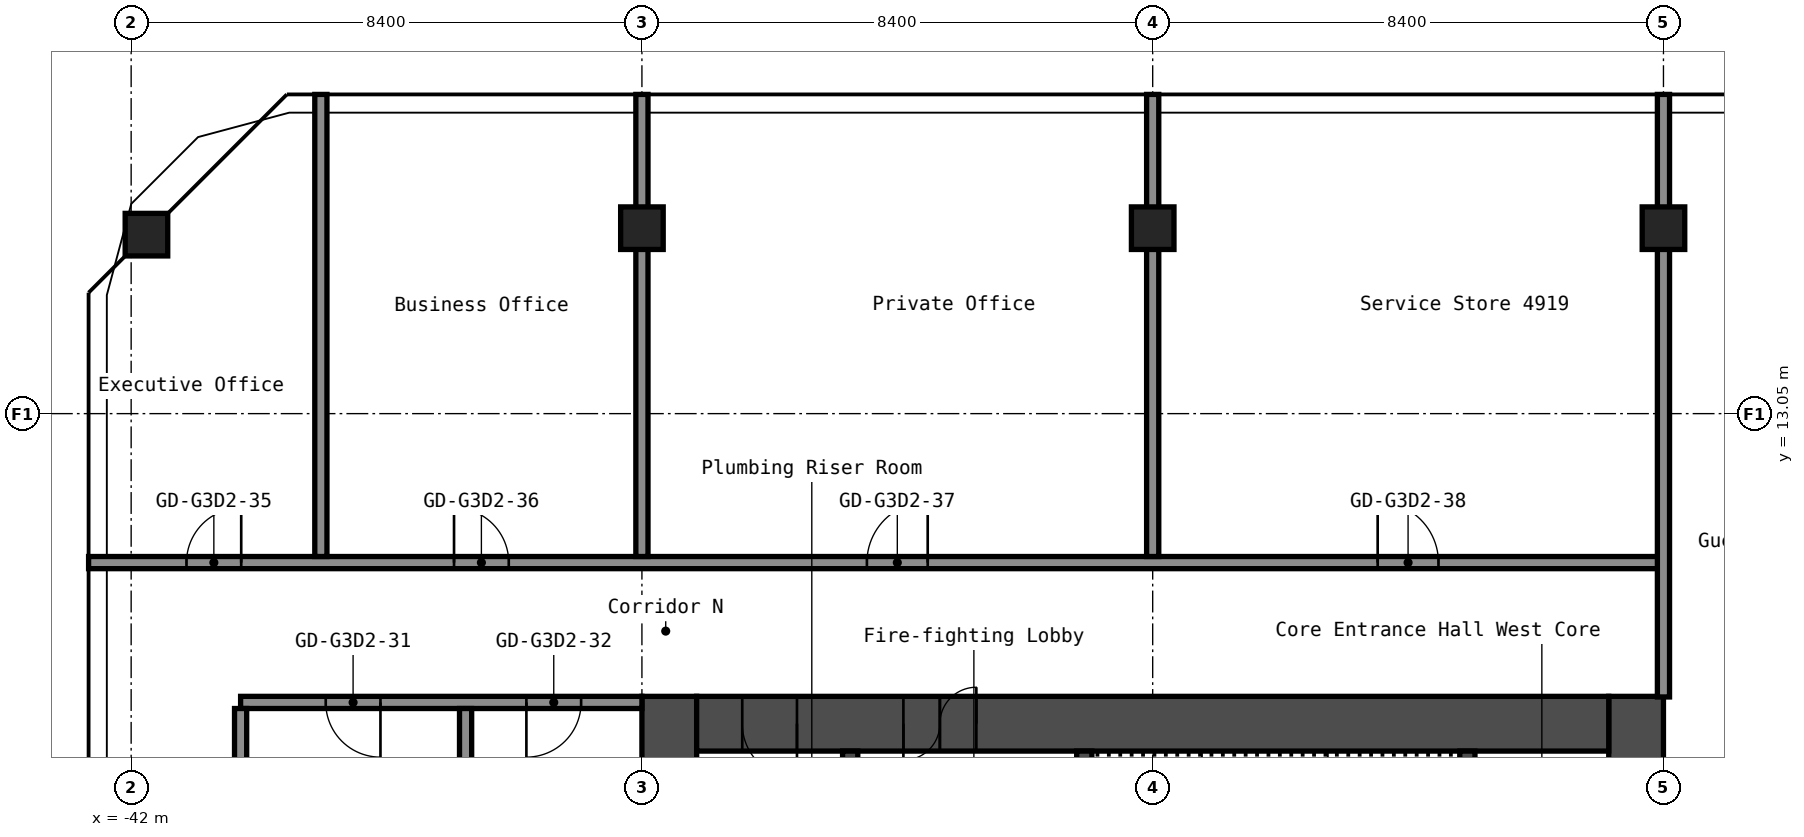
"""IFC4 building model, lengths in metres.
Left out: names, types, materials, properties, quantities, classifications, styles, units other than length and angle.
Written with IfcOpenShell. Run it as: python <this file> out.ifc"""

import sys

from ifc_helpers import new_model, si_unit, direction, frame, frame_2d, origin, origin_2d, place, context, subcontext, project, spatial, rectangle, hollow_rectangle, extrude, element, fill, save


model = new_model("IFC4")
c1 = context("Model", 3, precision=1e-05, world=origin(), true_north=direction((0.0, 1.0)))
c2 = subcontext(c1, "Body", "Model", "MODEL_VIEW")
j1 = project(units=[si_unit("LENGTHUNIT", "METRE"), si_unit("PLANEANGLEUNIT", "RADIAN")], contexts=[c1])
p1 = place(None, origin())
s1 = spatial("IfcSite", under=j1, at=p1, CompositionType="ELEMENT")
p2 = place(p1, origin())
s2 = spatial("IfcBuilding", under=s1, at=p2, CompositionType="ELEMENT")
p3 = place(p2, frame((0.0, 0.0, 172.6)))
s3 = spatial("IfcBuildingStorey", under=s2, at=p3, CompositionType="ELEMENT", Elevation=172.6)
for number, where, z_axis, x_axis in (
    (1, (-41.749, 15.994, 0.0), (0.0, 0.0, 1.0), (1.0, 0.0, 0.0)),
    (2, (-33.6, 16.1, 0.0), (0.0, 0.0, 1.0), (1.0, 0.0, 0.0)),
    (3, (-25.2, 16.1, 0.0), (0.0, 0.0, 1.0), (1.0, 0.0, 0.0)),
    (4, (-16.8, 16.1, 0.0), (0.0, 0.0, 1.0), (1.0, 0.0, 0.0)),
):
    element("IfcColumn", number, at=place(p3, frame(where, z_axis=z_axis, x_axis=x_axis)), inside=s3, PredefinedType="COLUMN", context=c2, shape_type="SweptSolid", body=[
        extrude(hollow_rectangle(XDim=0.7, YDim=0.7, WallThickness=0.028, at=origin_2d()), origin(), (0.0, 0.0, 1.0), 2.9),
    ])
p4 = place(p3, frame((-17.25, -8.4, 0.0), z_axis=(0.0, 0.0, 1.0), x_axis=(0.0, 1.0, 0.0)))
e5 = element("IfcWall", 5, at=p4, inside=s3, PredefinedType="SHEAR", context=c2, shape_type="SweptSolid", body=[
    extrude(rectangle(XDim=16.8, YDim=0.9, at=frame_2d((8.4, 0.0))), origin(), (0.0, 0.0, 1.0), 2.9),
])
p5 = place(p4, frame((7.1, 0.0, 0.0)))
e6 = element("IfcOpeningElement", 6, at=p5, cuts=e5, PredefinedType="OPENING", context=c2, shape_type="SweptSolid", body=[
    extrude(rectangle(XDim=1.6, YDim=2.1, at=frame_2d((0.8, 1.05))), frame((0.0, 0.46, 0.0), z_axis=(0.0, -1.0, 0.0), x_axis=(1.0, 0.0, 0.0)), (0.0, 0.0, 1.0), 0.92),
])
p6 = place(p3, frame((-33.15, -8.4, 0.0), z_axis=(0.0, 0.0, 1.0), x_axis=(0.0, 1.0, 0.0)))
e7 = element("IfcWall", 7, at=p6, inside=s3, PredefinedType="SHEAR", context=c2, shape_type="SweptSolid", body=[
    extrude(rectangle(XDim=16.8, YDim=0.9, at=frame_2d((8.4, 0.0))), origin(), (0.0, 0.0, 1.0), 2.9),
])
p7 = place(p3, frame((-32.7, 7.95, 0.0), z_axis=(0.0, 0.0, 1.0), x_axis=(1.0, 0.0, 0.0)))
e8 = element("IfcWall", 8, at=p7, inside=s3, PredefinedType="SHEAR", context=c2, shape_type="SweptSolid", body=[
    extrude(rectangle(XDim=15.0, YDim=0.9, at=frame_2d((7.5, 0.0))), origin(), (0.0, 0.0, 1.0), 2.9),
])
p8 = place(p7, frame((3.4, 0.0, 0.0)))
e9 = element("IfcOpeningElement", 9, at=p8, cuts=e8, PredefinedType="OPENING", context=c2, shape_type="SweptSolid", body=[
    extrude(rectangle(XDim=1.2, YDim=2.1, at=frame_2d((0.6, 1.05))), frame((0.0, 0.46, 0.0), z_axis=(0.0, -1.0, 0.0), x_axis=(1.0, 0.0, 0.0)), (0.0, 0.0, 1.0), 0.92),
])
p9 = place(p7, frame((0.75, 0.0, 0.0)))
e10 = element("IfcOpeningElement", 10, at=p9, cuts=e8, PredefinedType="OPENING", context=c2, shape_type="SweptSolid", body=[
    extrude(rectangle(XDim=0.9, YDim=2.1, at=frame_2d((0.45, 1.05))), frame((0.0, 0.46, 0.0), z_axis=(0.0, -1.0, 0.0), x_axis=(1.0, 0.0, 0.0)), (0.0, 0.0, 1.0), 0.92),
])
p10 = place(p3, frame((-20.025, 1.2, 0.0), z_axis=(0.0, 0.0, 1.0), x_axis=(0.0, 1.0, 0.0)))
e11 = element("IfcWall", 11, at=p10, inside=s3, PredefinedType="SHEAR", context=c2, shape_type="SweptSolid", body=[
    extrude(rectangle(XDim=6.3, YDim=0.25, at=frame_2d((3.15, 0.0))), origin(), (0.0, 0.0, 1.0), 2.9),
])
p11 = place(p3, frame((-26.325, 3.75, 0.0), z_axis=(0.0, 0.0, 1.0), x_axis=(0.0, 1.0, 0.0)))
e12 = element("IfcWall", 12, at=p11, inside=s3, PredefinedType="SHEAR", context=c2, shape_type="SweptSolid", body=[
    extrude(rectangle(XDim=3.75, YDim=0.25, at=frame_2d((1.875, 0.0))), origin(), (0.0, 0.0, 1.0), 2.9),
])
p12 = place(p11, frame((1.25, 0.0, 0.0)))
e13 = element("IfcOpeningElement", 13, at=p12, cuts=e12, PredefinedType="OPENING", context=c2, shape_type="SweptSolid", body=[
    extrude(rectangle(XDim=1.2, YDim=2.1, at=frame_2d((0.6, 1.05))), frame((0.0, 0.135, 0.0), z_axis=(0.0, -1.0, 0.0), x_axis=(1.0, 0.0, 0.0)), (0.0, 0.0, 1.0), 0.27),
])
p13 = place(p3, frame((-30.175, 1.45, 0.0), z_axis=(0.0, 0.0, 1.0), x_axis=(0.0, 1.0, 0.0)))
e14 = element("IfcWall", 14, at=p13, inside=s3, PredefinedType="SHEAR", context=c2, shape_type="SweptSolid", body=[
    extrude(rectangle(XDim=6.05, YDim=0.25, at=frame_2d((3.025, 0.0))), origin(), (0.0, 0.0, 1.0), 2.9),
])
p14 = place(p13, frame((2.625, 0.0, 0.0)))
e15 = element("IfcOpeningElement", 15, at=p14, cuts=e14, PredefinedType="OPENING", context=c2, shape_type="SweptSolid", body=[
    extrude(rectangle(XDim=1.1, YDim=2.1, at=frame_2d((0.55, 1.05))), frame((0.0, 0.135, 0.0), z_axis=(0.0, -1.0, 0.0), x_axis=(1.0, 0.0, 0.0)), (0.0, 0.0, 1.0), 0.27),
])
p15 = place(p3, frame((-40.2, 8.3, 0.0), z_axis=(0.0, 0.0, 1.0), x_axis=(1.0, 0.0, 0.0)))
e16 = element("IfcWall", 16, at=p15, inside=s3, PredefinedType="PARTITIONING", context=c2, shape_type="SweptSolid", body=[
    extrude(rectangle(XDim=6.6, YDim=0.2, at=frame_2d((3.3, 0.0))), origin(), (0.0, 0.0, 1.0), 2.9),
])
p16 = place(p15, frame((1.4, 0.0, 0.0)))
e17 = element("IfcOpeningElement", 17, at=p16, cuts=e16, PredefinedType="OPENING", context=c2, shape_type="SweptSolid", body=[
    extrude(rectangle(XDim=0.9, YDim=2.1, at=frame_2d((0.45, 1.05))), frame((0.0, 0.11, 0.0), z_axis=(0.0, -1.0, 0.0), x_axis=(1.0, 0.0, 0.0)), (0.0, 0.0, 1.0), 0.22),
])
p17 = place(p15, frame((4.7, 0.0, 0.0)))
e18 = element("IfcOpeningElement", 18, at=p17, cuts=e16, PredefinedType="OPENING", context=c2, shape_type="SweptSolid", body=[
    extrude(rectangle(XDim=0.9, YDim=2.1, at=frame_2d((0.45, 1.05))), frame((0.0, 0.11, 0.0), z_axis=(0.0, -1.0, 0.0), x_axis=(1.0, 0.0, 0.0)), (0.0, 0.0, 1.0), 0.22),
])
p18 = place(p3, frame((-42.7, 10.6, 0.0), z_axis=(0.0, 0.0, 1.0), x_axis=(1.0, 0.0, 0.0)))
e19 = element("IfcWall", 19, at=p18, inside=s3, PredefinedType="PARTITIONING", context=c2, shape_type="SweptSolid", body=[
    extrude(rectangle(XDim=25.9, YDim=0.2, at=frame_2d((12.95, 0.0))), origin(), (0.0, 0.0, 1.0), 2.9),
])
p19 = place(p18, frame((1.61, 0.0, 0.0)))
e20 = element("IfcOpeningElement", 20, at=p19, cuts=e19, PredefinedType="OPENING", context=c2, shape_type="SweptSolid", body=[
    extrude(rectangle(XDim=0.9, YDim=2.1, at=frame_2d((0.45, 1.05))), frame((0.0, 0.11, 0.0), z_axis=(0.0, -1.0, 0.0), x_axis=(1.0, 0.0, 0.0)), (0.0, 0.0, 1.0), 0.22),
])
p20 = place(p18, frame((6.01, 0.0, 0.0)))
e21 = element("IfcOpeningElement", 21, at=p20, cuts=e19, PredefinedType="OPENING", context=c2, shape_type="SweptSolid", body=[
    extrude(rectangle(XDim=0.9, YDim=2.1, at=frame_2d((0.45, 1.05))), frame((0.0, 0.11, 0.0), z_axis=(0.0, -1.0, 0.0), x_axis=(1.0, 0.0, 0.0)), (0.0, 0.0, 1.0), 0.22),
])
p21 = place(p18, frame((12.8, 0.0, 0.0)))
e22 = element("IfcOpeningElement", 22, at=p21, cuts=e19, PredefinedType="OPENING", context=c2, shape_type="SweptSolid", body=[
    extrude(rectangle(XDim=1.0, YDim=2.1, at=frame_2d((0.5, 1.05))), frame((0.0, 0.11, 0.0), z_axis=(0.0, -1.0, 0.0), x_axis=(1.0, 0.0, 0.0)), (0.0, 0.0, 1.0), 0.22),
])
p22 = place(p18, frame((21.2, 0.0, 0.0)))
e23 = element("IfcOpeningElement", 23, at=p22, cuts=e19, PredefinedType="OPENING", context=c2, shape_type="SweptSolid", body=[
    extrude(rectangle(XDim=1.0, YDim=2.1, at=frame_2d((0.5, 1.05))), frame((0.0, 0.11, 0.0), z_axis=(0.0, -1.0, 0.0), x_axis=(1.0, 0.0, 0.0)), (0.0, 0.0, 1.0), 0.22),
])
p23 = place(p3, frame((-40.2, -8.2, 0.0), z_axis=(0.0, 0.0, 1.0), x_axis=(0.0, 1.0, 0.0)))
e24 = element("IfcWall", 24, at=p23, inside=s3, PredefinedType="PARTITIONING", context=c2, shape_type="SweptSolid", body=[
    extrude(rectangle(XDim=16.4, YDim=0.2, at=frame_2d((8.2, 0.0))), origin(), (0.0, 0.0, 1.0), 2.9),
])
p24 = place(p3, frame((-38.88, 10.7, 0.0), z_axis=(0.0, 0.0, 1.0), x_axis=(0.0, 1.0, 0.0)))
e25 = element("IfcWall", 25, at=p24, inside=s3, PredefinedType="PARTITIONING", context=c2, shape_type="SweptSolid", body=[
    extrude(rectangle(XDim=7.6, YDim=0.2, at=frame_2d((3.8, 0.0))), origin(), (0.0, 0.0, 1.0), 2.9),
])
p25 = place(p3, frame((-36.5, 0.0, 0.0), z_axis=(0.0, 0.0, 1.0), x_axis=(0.0, 1.0, 0.0)))
e26 = element("IfcWall", 26, at=p25, inside=s3, PredefinedType="PARTITIONING", context=c2, shape_type="SweptSolid", body=[
    extrude(rectangle(XDim=8.2, YDim=0.2, at=frame_2d((4.1, 0.0))), origin(), (0.0, 0.0, 1.0), 2.9),
])
for number, where, z_axis, x_axis in (
    (27, (-33.6, 10.7, 0.0), (0.0, 0.0, 1.0), (0.0, 1.0, 0.0)),
    (28, (-25.2, 10.7, 0.0), (0.0, 0.0, 1.0), (0.0, 1.0, 0.0)),
):
    element("IfcWall", number, at=place(p3, frame(where, z_axis=z_axis, x_axis=x_axis)), inside=s3, PredefinedType="PARTITIONING", context=c2, shape_type="SweptSolid", body=[
        extrude(rectangle(XDim=7.6, YDim=0.2, at=frame_2d((3.8, 0.0))), origin(), (0.0, 0.0, 1.0), 2.9),
    ])
p26 = place(p3, frame((-16.8, 8.39, 0.0), z_axis=(0.0, 0.0, 1.0), x_axis=(0.0, 1.0, 0.0)))
e29 = element("IfcWall", 29, at=p26, inside=s3, PredefinedType="PARTITIONING", context=c2, shape_type="SweptSolid", body=[
    extrude(rectangle(XDim=9.91, YDim=0.2, at=frame_2d((4.955, 0.0))), origin(), (0.0, 0.0, 1.0), 2.9),
])
p27 = place(p8, origin())
e30 = element("IfcDoor", 30, at=p27, inside=s3, OperationType="DOUBLE_DOOR_SINGLE_SWING", PredefinedType="DOOR", context=c2, shape_type="SweptSolid", body=[
    extrude(rectangle(XDim=1.2, YDim=2.1, at=frame_2d((0.6, 1.05))), frame((0.0, 0.025, 0.0), z_axis=(0.0, -1.0, 0.0), x_axis=(1.0, 0.0, 0.0)), (0.0, 0.0, 1.0), 0.05),
])
fill(e9, e30)
p28 = place(p9, origin())
e31 = element("IfcDoor", 31, at=p28, inside=s3, OperationType="SINGLE_SWING_RIGHT", PredefinedType="DOOR", context=c2, shape_type="SweptSolid", body=[
    extrude(rectangle(XDim=0.9, YDim=2.1, at=frame_2d((0.45, 1.05))), frame((0.0, 0.025, 0.0), z_axis=(0.0, -1.0, 0.0), x_axis=(1.0, 0.0, 0.0)), (0.0, 0.0, 1.0), 0.05),
])
fill(e10, e31)
p29 = place(p16, origin())
e32 = element("IfcDoor", 32, at=p29, inside=s3, OperationType="SINGLE_SWING_RIGHT", PredefinedType="DOOR", context=c2, shape_type="SweptSolid", body=[
    extrude(rectangle(XDim=0.9, YDim=2.1, at=frame_2d((0.45, 1.05))), frame((0.0, 0.025, 0.0), z_axis=(0.0, -1.0, 0.0), x_axis=(1.0, 0.0, 0.0)), (0.0, 0.0, 1.0), 0.05),
])
fill(e17, e32)
p30 = place(p17, origin())
e33 = element("IfcDoor", 33, at=p30, inside=s3, OperationType="SINGLE_SWING_LEFT", PredefinedType="DOOR", context=c2, shape_type="SweptSolid", body=[
    extrude(rectangle(XDim=0.9, YDim=2.1, at=frame_2d((0.45, 1.05))), frame((0.0, 0.025, 0.0), z_axis=(0.0, -1.0, 0.0), x_axis=(1.0, 0.0, 0.0)), (0.0, 0.0, 1.0), 0.05),
])
fill(e18, e33)
p31 = place(p19, origin())
e34 = element("IfcDoor", 34, at=p31, inside=s3, OperationType="SINGLE_SWING_LEFT", PredefinedType="DOOR", context=c2, shape_type="SweptSolid", body=[
    extrude(rectangle(XDim=0.9, YDim=2.1, at=frame_2d((0.45, 1.05))), frame((0.0, 0.025, 0.0), z_axis=(0.0, -1.0, 0.0), x_axis=(1.0, 0.0, 0.0)), (0.0, 0.0, 1.0), 0.05),
])
fill(e20, e34)
p32 = place(p20, origin())
e35 = element("IfcDoor", 35, at=p32, inside=s3, OperationType="SINGLE_SWING_RIGHT", PredefinedType="DOOR", context=c2, shape_type="SweptSolid", body=[
    extrude(rectangle(XDim=0.9, YDim=2.1, at=frame_2d((0.45, 1.05))), frame((0.0, 0.025, 0.0), z_axis=(0.0, -1.0, 0.0), x_axis=(1.0, 0.0, 0.0)), (0.0, 0.0, 1.0), 0.05),
])
fill(e21, e35)
p33 = place(p21, origin())
e36 = element("IfcDoor", 36, at=p33, inside=s3, OperationType="SINGLE_SWING_LEFT", PredefinedType="DOOR", context=c2, shape_type="SweptSolid", body=[
    extrude(rectangle(XDim=1.0, YDim=2.1, at=frame_2d((0.5, 1.05))), frame((0.0, 0.025, 0.0), z_axis=(0.0, -1.0, 0.0), x_axis=(1.0, 0.0, 0.0)), (0.0, 0.0, 1.0), 0.05),
])
fill(e22, e36)
p34 = place(p22, origin())
e37 = element("IfcDoor", 37, at=p34, inside=s3, OperationType="SINGLE_SWING_RIGHT", PredefinedType="DOOR", context=c2, shape_type="SweptSolid", body=[
    extrude(rectangle(XDim=1.0, YDim=2.1, at=frame_2d((0.5, 1.05))), frame((0.0, 0.025, 0.0), z_axis=(0.0, -1.0, 0.0), x_axis=(1.0, 0.0, 0.0)), (0.0, 0.0, 1.0), 0.05),
])
fill(e23, e37)
save(model, sys.argv[1])
